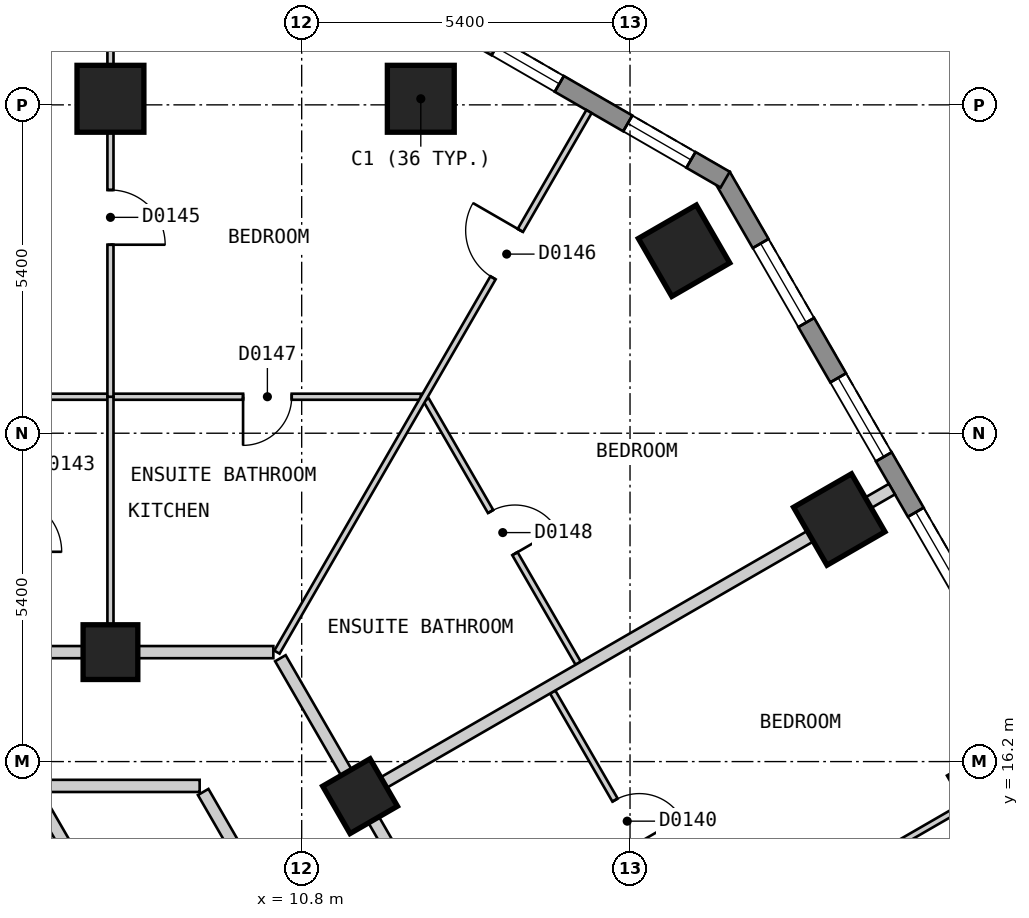
"""IFC4 building model, lengths in metres.
Left out: names, types, materials, properties, quantities, classifications, styles, units other than length and angle.
Written with IfcOpenShell. Run it as: python <this file> out.ifc"""

import sys

from ifc_helpers import new_model, si_unit, direction, frame, frame_2d, origin, origin_2d, place, context, subcontext, project, spatial, polyline, rectangle, outline, extrude, element, fill, save


model = new_model("IFC4")
c1 = context("Model", 3, precision=1e-05, world=origin(), true_north=direction((0.0, 1.0)))
c2 = subcontext(c1, "Body", "Model", "MODEL_VIEW")
j1 = project(units=[si_unit("LENGTHUNIT", "METRE"), si_unit("PLANEANGLEUNIT", "RADIAN")], contexts=[c1])
p1 = place(None, origin())
s1 = spatial("IfcSite", under=j1, at=p1, CompositionType="ELEMENT")
p2 = place(p1, origin())
s2 = spatial("IfcBuilding", under=s1, at=p2, CompositionType="ELEMENT")
p3 = place(p2, frame((0.0, 0.0, 29.4)))
s3 = spatial("IfcBuildingStorey", under=s2, at=p3, CompositionType="ELEMENT", Elevation=29.4)
for number, where, z_axis, x_axis in (
    (1, (12.759, 27.1, 0.0), (0.0, 0.0, 1.0), (-1.0, 0.0, 0.0)),
    (2, (7.655, 27.1, 0.0), (0.0, 0.0, 1.0), (-1.0, 0.0, 0.0)),
    (3, (22.193, 15.761, 0.0), (0.0, 0.0, 1.0), (-0.5, 0.866, 0.0)),
    (4, (19.641, 20.181, 0.0), (0.0, 0.0, 1.0), (-0.5, 0.866, 0.0)),
    (5, (17.089, 24.601, 0.0), (0.0, 0.0, 1.0), (-0.5, 0.866, 0.0)),
):
    element("IfcColumn", number, at=place(p3, frame(where, z_axis=z_axis, x_axis=x_axis)), inside=s3, PredefinedType="COLUMN", context=c2, shape_type="SweptSolid", body=[
        extrude(rectangle(XDim=1.1, YDim=1.1, at=origin_2d()), origin(), (0.0, 0.0, 1.0), 3.0),
    ])
for number, where, z_axis, x_axis in (
    (6, (11.76, 15.631, 0.0), (0.0, 0.0, 1.0), (-0.5, 0.866, 0.0)),
    (7, (7.655, 18.0, 0.0), (0.0, 0.0, 1.0), (-1.0, 0.0, 0.0)),
):
    element("IfcColumn", number, at=place(p3, frame(where, z_axis=z_axis, x_axis=x_axis)), inside=s3, PredefinedType="COLUMN", context=c2, shape_type="SweptSolid", body=[
        extrude(rectangle(XDim=0.9, YDim=0.9, at=origin_2d()), origin(), (0.0, 0.0, 1.0), 3.0),
    ])
p4 = place(p3, frame((31.22, 2.425, 0.0), z_axis=(0.0, 0.0, 1.0), x_axis=(-0.500001938803, 0.866024284413, 0.0)))
e8 = element("IfcWall", 8, at=p4, inside=s3, PredefinedType="SOLIDWALL", context=c2, shape_type="SweptSolid", body=[
    extrude(outline(polyline([(0.0, -0.15), (27.02, -0.15), (26.94, 0.15), (0.08, 0.15), (0.0, -0.15)])), origin(), (0.0, 0.0, 1.0), 2.7),
])
p5 = place(p4, frame((1.277, 0.0, 0.15)))
e9 = element("IfcOpeningElement", 9, at=p5, cuts=e8, PredefinedType="OPENING", context=c2, shape_type="SweptSolid", body=[
    extrude(rectangle(XDim=1.5, YDim=2.1, at=frame_2d((0.75, 1.05))), frame((0.0, 0.16, 0.0), z_axis=(0.0, -1.0, 0.0), x_axis=(1.0, 0.0, 0.0)), (0.0, 0.0, 1.0), 0.32),
])
p6 = place(p4, frame((3.829, 0.0, 0.15)))
e10 = element("IfcOpeningElement", 10, at=p6, cuts=e8, PredefinedType="OPENING", context=c2, shape_type="SweptSolid", body=[
    extrude(rectangle(XDim=1.5, YDim=2.1, at=frame_2d((0.75, 1.05))), frame((0.0, 0.16, 0.0), z_axis=(0.0, -1.0, 0.0), x_axis=(1.0, 0.0, 0.0)), (0.0, 0.0, 1.0), 0.32),
])
p7 = place(p4, frame((6.382, 0.0, 0.15)))
e11 = element("IfcOpeningElement", 11, at=p7, cuts=e8, PredefinedType="OPENING", context=c2, shape_type="SweptSolid", body=[
    extrude(rectangle(XDim=1.5, YDim=2.1, at=frame_2d((0.75, 1.05))), frame((0.0, 0.16, 0.0), z_axis=(0.0, -1.0, 0.0), x_axis=(1.0, 0.0, 0.0)), (0.0, 0.0, 1.0), 0.32),
])
p8 = place(p4, frame((8.933, 0.0, 0.15)))
e12 = element("IfcOpeningElement", 12, at=p8, cuts=e8, PredefinedType="OPENING", context=c2, shape_type="SweptSolid", body=[
    extrude(rectangle(XDim=1.5, YDim=2.1, at=frame_2d((0.75, 1.05))), frame((0.0, 0.16, 0.0), z_axis=(0.0, -1.0, 0.0), x_axis=(1.0, 0.0, 0.0)), (0.0, 0.0, 1.0), 0.32),
])
p9 = place(p4, frame((11.485, 0.0, 0.15)))
e13 = element("IfcOpeningElement", 13, at=p9, cuts=e8, PredefinedType="OPENING", context=c2, shape_type="SweptSolid", body=[
    extrude(rectangle(XDim=1.5, YDim=2.1, at=frame_2d((0.75, 1.05))), frame((0.0, 0.16, 0.0), z_axis=(0.0, -1.0, 0.0), x_axis=(1.0, 0.0, 0.0)), (0.0, 0.0, 1.0), 0.32),
])
p10 = place(p4, frame((14.037, 0.0, 0.15)))
e14 = element("IfcOpeningElement", 14, at=p10, cuts=e8, PredefinedType="OPENING", context=c2, shape_type="SweptSolid", body=[
    extrude(rectangle(XDim=1.5, YDim=2.1, at=frame_2d((0.75, 1.05))), frame((0.0, 0.16, 0.0), z_axis=(0.0, -1.0, 0.0), x_axis=(1.0, 0.0, 0.0)), (0.0, 0.0, 1.0), 0.32),
])
p11 = place(p4, frame((16.589, 0.0, 0.15)))
e15 = element("IfcOpeningElement", 15, at=p11, cuts=e8, PredefinedType="OPENING", context=c2, shape_type="SweptSolid", body=[
    extrude(rectangle(XDim=1.5, YDim=2.1, at=frame_2d((0.75, 1.05))), frame((0.0, 0.16, 0.0), z_axis=(0.0, -1.0, 0.0), x_axis=(1.0, 0.0, 0.0)), (0.0, 0.0, 1.0), 0.32),
])
p12 = place(p4, frame((19.141, 0.0, 0.15)))
e16 = element("IfcOpeningElement", 16, at=p12, cuts=e8, PredefinedType="OPENING", context=c2, shape_type="SweptSolid", body=[
    extrude(rectangle(XDim=1.5, YDim=2.1, at=frame_2d((0.75, 1.05))), frame((0.0, 0.16, 0.0), z_axis=(0.0, -1.0, 0.0), x_axis=(1.0, 0.0, 0.0)), (0.0, 0.0, 1.0), 0.32),
])
p13 = place(p4, frame((21.693, 0.0, 0.15)))
e17 = element("IfcOpeningElement", 17, at=p13, cuts=e8, PredefinedType="OPENING", context=c2, shape_type="SweptSolid", body=[
    extrude(rectangle(XDim=1.5, YDim=2.1, at=frame_2d((0.75, 1.05))), frame((0.0, 0.16, 0.0), z_axis=(0.0, -1.0, 0.0), x_axis=(1.0, 0.0, 0.0)), (0.0, 0.0, 1.0), 0.32),
])
p14 = place(p4, frame((24.244, 0.0, 0.15)))
e18 = element("IfcOpeningElement", 18, at=p14, cuts=e8, PredefinedType="OPENING", context=c2, shape_type="SweptSolid", body=[
    extrude(rectangle(XDim=1.5, YDim=2.1, at=frame_2d((0.75, 1.05))), frame((0.0, 0.16, 0.0), z_axis=(0.0, -1.0, 0.0), x_axis=(1.0, 0.0, 0.0)), (0.0, 0.0, 1.0), 0.32),
])
p15 = place(p3, frame((17.765, 25.77, 0.0), z_axis=(0.0, 0.0, 1.0), x_axis=(-0.866010750942, 0.50002537861, 0.0)))
e19 = element("IfcWall", 19, at=p15, inside=s3, PredefinedType="SOLIDWALL", context=c2, shape_type="SweptSolid", body=[
    extrude(outline(polyline([(0.0, -0.15), (5.0, -0.15), (4.919, 0.15), (0.08, 0.15), (0.0, -0.15)])), origin(), (0.0, 0.0, 1.0), 2.7),
])
p16 = place(p15, frame((0.65, 0.0, 0.15)))
e20 = element("IfcOpeningElement", 20, at=p16, cuts=e19, PredefinedType="OPENING", context=c2, shape_type="SweptSolid", body=[
    extrude(rectangle(XDim=1.2, YDim=2.1, at=frame_2d((0.6, 1.05))), frame((0.0, 0.16, 0.0), z_axis=(0.0, -1.0, 0.0), x_axis=(1.0, 0.0, 0.0)), (0.0, 0.0, 1.0), 0.32),
])
p17 = place(p15, frame((3.15, 0.0, 0.15)))
e21 = element("IfcOpeningElement", 21, at=p17, cuts=e19, PredefinedType="OPENING", context=c2, shape_type="SweptSolid", body=[
    extrude(rectangle(XDim=1.2, YDim=2.1, at=frame_2d((0.6, 1.05))), frame((0.0, 0.16, 0.0), z_axis=(0.0, -1.0, 0.0), x_axis=(1.0, 0.0, 0.0)), (0.0, 0.0, 1.0), 0.32),
])
p18 = place(p3, frame((6.409, 15.7, 0.0), z_axis=(0.0, 0.0, 1.0), x_axis=(0.499930377127, -0.866065596838, 0.0)))
e22 = element("IfcWall", 22, at=p18, inside=s3, PredefinedType="PARTITIONING", context=c2, shape_type="SweptSolid", body=[
    extrude(rectangle(XDim=8.775, YDim=0.2, at=frame_2d((4.388, 0.0))), origin(), (0.0, 0.0, 1.0), 2.7),
])
p19 = place(p3, frame((9.18, 15.7, 0.0), z_axis=(0.0, 0.0, 1.0), x_axis=(0.500003652032, -0.866023295272, 0.0)))
e23 = element("IfcWall", 23, at=p19, inside=s3, PredefinedType="PARTITIONING", context=c2, shape_type="SweptSolid", body=[
    extrude(rectangle(XDim=18.012, YDim=0.2, at=frame_2d((9.006, 0.0))), origin(), (0.0, 0.0, 1.0), 2.7),
])
p20 = place(p19, frame((8.556, 0.0, 0.0)))
e24 = element("IfcOpeningElement", 24, at=p20, cuts=e23, PredefinedType="OPENING", context=c2, shape_type="SweptSolid", body=[
    extrude(rectangle(XDim=0.9, YDim=2.1, at=frame_2d((0.45, 1.05))), frame((0.0, 0.11, 0.0), z_axis=(0.0, -1.0, 0.0), x_axis=(1.0, 0.0, 0.0)), (0.0, 0.0, 1.0), 0.22),
])
p21 = place(p3, frame((10.45, 17.9, 0.0), z_axis=(0.0, 0.0, 1.0), x_axis=(0.500034352617, -0.866005569383, 0.0)))
e25 = element("IfcWall", 25, at=p21, inside=s3, PredefinedType="PARTITIONING", context=c2, shape_type="SweptSolid", body=[
    extrude(rectangle(XDim=20.553, YDim=0.2, at=frame_2d((10.276, 0.0))), origin(), (0.0, 0.0, 1.0), 2.7),
])
p22 = place(p21, frame((14.903, 0.0, 0.0)))
e26 = element("IfcOpeningElement", 26, at=p22, cuts=e25, PredefinedType="OPENING", context=c2, shape_type="SweptSolid", body=[
    extrude(rectangle(XDim=1.0, YDim=2.1, at=frame_2d((0.5, 1.05))), frame((0.0, 0.11, 0.0), z_axis=(0.0, -1.0, 0.0), x_axis=(1.0, 0.0, 0.0)), (0.0, 0.0, 1.0), 0.22),
])
p23 = place(p21, frame((9.775, 0.0, 0.0)))
e27 = element("IfcOpeningElement", 27, at=p23, cuts=e25, PredefinedType="OPENING", context=c2, shape_type="SweptSolid", body=[
    extrude(rectangle(XDim=1.0, YDim=2.1, at=frame_2d((0.5, 1.05))), frame((0.0, 0.11, 0.0), z_axis=(0.0, -1.0, 0.0), x_axis=(1.0, 0.0, 0.0)), (0.0, 0.0, 1.0), 0.22),
])
p24 = place(p3, frame((6.351, 15.8, 0.0), z_axis=(0.0, 0.0, 1.0), x_axis=(1.0, 0.0, 0.0)))
e28 = element("IfcWall", 28, at=p24, inside=s3, PredefinedType="PARTITIONING", context=c2, shape_type="SweptSolid", body=[
    extrude(rectangle(XDim=2.771, YDim=0.2, at=frame_2d((1.385, 0.0))), origin(), (0.0, 0.0, 1.0), 2.7),
])
p25 = place(p3, frame((-10.276, 18.0, 0.0), z_axis=(0.0, 0.0, 1.0), x_axis=(1.0, 0.0, 0.0)))
e29 = element("IfcWall", 29, at=p25, inside=s3, PredefinedType="PARTITIONING", context=c2, shape_type="SweptSolid", body=[
    extrude(rectangle(XDim=20.61, YDim=0.2, at=frame_2d((10.305, 0.0))), origin(), (0.0, 0.0, 1.0), 2.7),
])
p26 = place(p25, frame((14.879, 0.0, 0.0)))
e30 = element("IfcOpeningElement", 30, at=p26, cuts=e29, PredefinedType="OPENING", context=c2, shape_type="SweptSolid", body=[
    extrude(rectangle(XDim=1.0, YDim=2.1, at=frame_2d((0.5, 1.05))), frame((0.0, 0.11, 0.0), z_axis=(0.0, -1.0, 0.0), x_axis=(1.0, 0.0, 0.0)), (0.0, 0.0, 1.0), 0.22),
])
p27 = place(p25, frame((9.775, 0.0, 0.0)))
e31 = element("IfcOpeningElement", 31, at=p27, cuts=e29, PredefinedType="OPENING", context=c2, shape_type="SweptSolid", body=[
    extrude(rectangle(XDim=1.0, YDim=2.1, at=frame_2d((0.5, 1.05))), frame((0.0, 0.11, 0.0), z_axis=(0.0, -1.0, 0.0), x_axis=(1.0, 0.0, 0.0)), (0.0, 0.0, 1.0), 0.22),
])
p28 = place(p25, frame((4.671, 0.0, 0.0)))
e32 = element("IfcOpeningElement", 32, at=p28, cuts=e29, PredefinedType="OPENING", context=c2, shape_type="SweptSolid", body=[
    extrude(rectangle(XDim=1.0, YDim=2.1, at=frame_2d((0.5, 1.05))), frame((0.0, 0.11, 0.0), z_axis=(0.0, -1.0, 0.0), x_axis=(1.0, 0.0, 0.0)), (0.0, 0.0, 1.0), 0.22),
])
p29 = place(p25, frame((0.837, 0.0, 0.0)))
e33 = element("IfcOpeningElement", 33, at=p29, cuts=e29, PredefinedType="OPENING", context=c2, shape_type="SweptSolid", body=[
    extrude(rectangle(XDim=0.8, YDim=2.1, at=frame_2d((0.4, 1.05))), frame((0.0, 0.11, 0.0), z_axis=(0.0, -1.0, 0.0), x_axis=(1.0, 0.0, 0.0)), (0.0, 0.0, 1.0), 0.22),
])
p30 = place(p3, frame((14.928, 17.344, 0.0), z_axis=(0.0, 0.0, 1.0), x_axis=(0.499881743012, -0.866093668724, 0.0)))
e34 = element("IfcWall", 34, at=p30, inside=s3, PredefinedType="PARTITIONING", context=c2, shape_type="SweptSolid", body=[
    extrude(rectangle(XDim=4.953, YDim=0.1, at=frame_2d((2.477, 0.0))), origin(), (0.0, 0.0, 1.0), 2.7),
])
p31 = place(p30, frame((2.052, 0.0, 0.0)))
e35 = element("IfcOpeningElement", 35, at=p31, cuts=e34, PredefinedType="OPENING", context=c2, shape_type="SweptSolid", body=[
    extrude(rectangle(XDim=0.8, YDim=2.1, at=frame_2d((0.4, 1.05))), frame((0.0, 0.06, 0.0), z_axis=(0.0, -1.0, 0.0), x_axis=(1.0, 0.0, 0.0)), (0.0, 0.0, 1.0), 0.12),
])
p32 = place(p3, frame((12.846, 22.15, 0.0), z_axis=(0.0, 0.0, 1.0), x_axis=(0.500002715276, -0.866023836113, 0.0)))
e36 = element("IfcWall", 36, at=p32, inside=s3, PredefinedType="PARTITIONING", context=c2, shape_type="SweptSolid", body=[
    extrude(rectangle(XDim=5.002, YDim=0.1, at=frame_2d((2.501, 0.0))), origin(), (0.0, 0.0, 1.0), 2.7),
])
p33 = place(p32, frame((2.122, 0.0, 0.0)))
e37 = element("IfcOpeningElement", 37, at=p33, cuts=e36, PredefinedType="OPENING", context=c2, shape_type="SweptSolid", body=[
    extrude(rectangle(XDim=0.8, YDim=2.1, at=frame_2d((0.4, 1.05))), frame((0.0, 0.06, 0.0), z_axis=(0.0, -1.0, 0.0), x_axis=(1.0, 0.0, 0.0)), (0.0, 0.0, 1.0), 0.12),
])
p34 = place(p3, frame((2.651, 22.2, 0.0), z_axis=(0.0, 0.0, 1.0), x_axis=(1.0, 0.0, 0.0)))
e38 = element("IfcWall", 38, at=p34, inside=s3, PredefinedType="PARTITIONING", context=c2, shape_type="SweptSolid", body=[
    extrude(rectangle(XDim=10.109, YDim=0.1, at=frame_2d((5.055, 0.0))), origin(), (0.0, 0.0, 1.0), 2.7),
])
p35 = place(p34, frame((2.002, 0.0, 0.0)))
e39 = element("IfcOpeningElement", 39, at=p35, cuts=e38, PredefinedType="OPENING", context=c2, shape_type="SweptSolid", body=[
    extrude(rectangle(XDim=0.9, YDim=2.1, at=frame_2d((0.45, 1.05))), frame((0.0, 0.06, 0.0), z_axis=(0.0, -1.0, 0.0), x_axis=(1.0, 0.0, 0.0)), (0.0, 0.0, 1.0), 0.12),
])
p36 = place(p34, frame((7.185, 0.0, 0.0)))
e40 = element("IfcOpeningElement", 40, at=p36, cuts=e38, PredefinedType="OPENING", context=c2, shape_type="SweptSolid", body=[
    extrude(rectangle(XDim=0.8, YDim=2.1, at=frame_2d((0.4, 1.05))), frame((0.0, 0.06, 0.0), z_axis=(0.0, -1.0, 0.0), x_axis=(1.0, 0.0, 0.0)), (0.0, 0.0, 1.0), 0.12),
])
p37 = place(p3, frame((10.393, 18.0, 0.0), z_axis=(0.0, 0.0, 1.0), x_axis=(0.499945497007, 0.866056868816, 0.0)))
e41 = element("IfcWall", 41, at=p37, inside=s3, PredefinedType="PARTITIONING", context=c2, shape_type="SweptSolid", body=[
    extrude(rectangle(XDim=10.265, YDim=0.1, at=frame_2d((5.132, 0.0))), origin(), (0.0, 0.0, 1.0), 2.7),
])
p38 = place(p37, frame((7.108, 0.0, 0.0)))
e42 = element("IfcOpeningElement", 42, at=p38, cuts=e41, PredefinedType="OPENING", context=c2, shape_type="SweptSolid", body=[
    extrude(rectangle(XDim=0.9, YDim=2.1, at=frame_2d((0.45, 1.05))), frame((0.0, 0.06, 0.0), z_axis=(0.0, -1.0, 0.0), x_axis=(1.0, 0.0, 0.0)), (0.0, 0.0, 1.0), 0.12),
])
p39 = place(p3, frame((7.655, 18.1, 0.0), z_axis=(0.0, 0.0, 1.0), x_axis=(0.0, 1.0, 0.0)))
e43 = element("IfcWall", 43, at=p39, inside=s3, PredefinedType="PARTITIONING", context=c2, shape_type="SweptSolid", body=[
    extrude(rectangle(XDim=4.1, YDim=0.1, at=frame_2d((2.05, 0.0))), origin(), (0.0, 0.0, 1.0), 2.7),
])
p40 = place(p3, frame((14.399, 11.261, 0.0), z_axis=(0.0, 0.0, 1.0), x_axis=(0.866022959057, 0.500004234368, 0.0)))
e44 = element("IfcWall", 44, at=p40, inside=s3, PredefinedType="PARTITIONING", context=c2, shape_type="SweptSolid", body=[
    extrude(rectangle(XDim=10.0, YDim=0.1, at=frame_2d((5.0, 0.0))), origin(), (0.0, 0.0, 1.0), 2.7),
])
p41 = place(p40, frame((4.775, 0.0, 0.0)))
e45 = element("IfcOpeningElement", 45, at=p41, cuts=e44, PredefinedType="OPENING", context=c2, shape_type="SweptSolid", body=[
    extrude(rectangle(XDim=0.9, YDim=2.1, at=frame_2d((0.45, 1.05))), frame((0.0, 0.06, 0.0), z_axis=(0.0, -1.0, 0.0), x_axis=(1.0, 0.0, 0.0)), (0.0, 0.0, 1.0), 0.12),
])
p42 = place(p3, frame((11.847, 15.681, 0.0), z_axis=(0.0, 0.0, 1.0), x_axis=(0.866022959057, 0.500004234368, 0.0)))
e46 = element("IfcWall", 46, at=p42, inside=s3, PredefinedType="PARTITIONING", context=c2, shape_type="SweptSolid", body=[
    extrude(rectangle(XDim=10.0, YDim=0.2, at=frame_2d((5.0, 0.0))), origin(), (0.0, 0.0, 1.0), 2.7),
])
p43 = place(p3, frame((7.655, 22.2, 0.0), z_axis=(0.0, 0.0, 1.0), x_axis=(0.0, 1.0, 0.0)))
e47 = element("IfcWall", 47, at=p43, inside=s3, PredefinedType="PARTITIONING", context=c2, shape_type="SweptSolid", body=[
    extrude(rectangle(XDim=5.9, YDim=0.1, at=frame_2d((2.95, 0.0))), origin(), (0.0, 0.0, 1.0), 2.7),
])
p44 = place(p43, frame((2.5, 0.0, 0.0)))
e48 = element("IfcOpeningElement", 48, at=p44, cuts=e47, PredefinedType="OPENING", context=c2, shape_type="SweptSolid", body=[
    extrude(rectangle(XDim=0.9, YDim=2.1, at=frame_2d((0.45, 1.05))), frame((0.0, 0.06, 0.0), z_axis=(0.0, -1.0, 0.0), x_axis=(1.0, 0.0, 0.0)), (0.0, 0.0, 1.0), 0.12),
])
p45 = place(p12, origin())
e49 = element("IfcWindow", 49, at=p45, inside=s3, PartitioningType="SINGLE_PANEL", PredefinedType="WINDOW", context=c2, shape_type="SweptSolid", body=[
    extrude(rectangle(XDim=1.5, YDim=2.1, at=frame_2d((0.75, 1.05))), frame((0.0, 0.03, 0.0), z_axis=(0.0, -1.0, 0.0), x_axis=(1.0, 0.0, 0.0)), (0.0, 0.0, 1.0), 0.06),
])
fill(e16, e49)
p46 = place(p13, origin())
e50 = element("IfcWindow", 50, at=p46, inside=s3, PartitioningType="SINGLE_PANEL", PredefinedType="WINDOW", context=c2, shape_type="SweptSolid", body=[
    extrude(rectangle(XDim=1.5, YDim=2.1, at=frame_2d((0.75, 1.05))), frame((0.0, 0.03, 0.0), z_axis=(0.0, -1.0, 0.0), x_axis=(1.0, 0.0, 0.0)), (0.0, 0.0, 1.0), 0.06),
])
fill(e17, e50)
p47 = place(p14, origin())
e51 = element("IfcWindow", 51, at=p47, inside=s3, PartitioningType="SINGLE_PANEL", PredefinedType="WINDOW", context=c2, shape_type="SweptSolid", body=[
    extrude(rectangle(XDim=1.5, YDim=2.1, at=frame_2d((0.75, 1.05))), frame((0.0, 0.03, 0.0), z_axis=(0.0, -1.0, 0.0), x_axis=(1.0, 0.0, 0.0)), (0.0, 0.0, 1.0), 0.06),
])
fill(e18, e51)
p48 = place(p16, origin())
e52 = element("IfcWindow", 52, at=p48, inside=s3, PartitioningType="SINGLE_PANEL", PredefinedType="WINDOW", context=c2, shape_type="SweptSolid", body=[
    extrude(rectangle(XDim=1.2, YDim=2.1, at=frame_2d((0.6, 1.05))), frame((0.0, 0.03, 0.0), z_axis=(0.0, -1.0, 0.0), x_axis=(1.0, 0.0, 0.0)), (0.0, 0.0, 1.0), 0.06),
])
fill(e20, e52)
p49 = place(p17, origin())
e53 = element("IfcWindow", 53, at=p49, inside=s3, PartitioningType="SINGLE_PANEL", PredefinedType="WINDOW", context=c2, shape_type="SweptSolid", body=[
    extrude(rectangle(XDim=1.2, YDim=2.1, at=frame_2d((0.6, 1.05))), frame((0.0, 0.03, 0.0), z_axis=(0.0, -1.0, 0.0), x_axis=(1.0, 0.0, 0.0)), (0.0, 0.0, 1.0), 0.06),
])
fill(e21, e53)
p50 = place(p31, origin())
e54 = element("IfcDoor", 54, at=p50, inside=s3, OperationType="SINGLE_SWING_RIGHT", PredefinedType="DOOR", context=c2, shape_type="SweptSolid", body=[
    extrude(rectangle(XDim=0.8, YDim=2.1, at=frame_2d((0.4, 1.05))), frame((0.0, 0.025, 0.0), z_axis=(0.0, -1.0, 0.0), x_axis=(1.0, 0.0, 0.0)), (0.0, 0.0, 1.0), 0.05),
])
fill(e35, e54)
p51 = place(p44, origin())
e55 = element("IfcDoor", 55, at=p51, inside=s3, OperationType="SINGLE_SWING_LEFT", PredefinedType="DOOR", context=c2, shape_type="SweptSolid", body=[
    extrude(rectangle(XDim=0.9, YDim=2.1, at=frame_2d((0.45, 1.05))), frame((0.0, 0.025, 0.0), z_axis=(0.0, -1.0, 0.0), x_axis=(1.0, 0.0, 0.0)), (0.0, 0.0, 1.0), 0.05),
])
fill(e48, e55)
p52 = place(p38, origin())
e56 = element("IfcDoor", 56, at=p52, inside=s3, OperationType="SINGLE_SWING_RIGHT", PredefinedType="DOOR", context=c2, shape_type="SweptSolid", body=[
    extrude(rectangle(XDim=0.9, YDim=2.1, at=frame_2d((0.45, 1.05))), frame((0.0, 0.025, 0.0), z_axis=(0.0, -1.0, 0.0), x_axis=(1.0, 0.0, 0.0)), (0.0, 0.0, 1.0), 0.05),
])
fill(e42, e56)
p53 = place(p36, origin())
e57 = element("IfcDoor", 57, at=p53, inside=s3, OperationType="SINGLE_SWING_LEFT", PredefinedType="DOOR", context=c2, shape_type="SweptSolid", body=[
    extrude(rectangle(XDim=0.8, YDim=2.1, at=frame_2d((0.4, 1.05))), frame((0.0, 0.025, 0.0), z_axis=(0.0, -1.0, 0.0), x_axis=(1.0, 0.0, 0.0)), (0.0, 0.0, 1.0), 0.05),
])
fill(e40, e57)
p54 = place(p33, origin())
e58 = element("IfcDoor", 58, at=p54, inside=s3, OperationType="SINGLE_SWING_RIGHT", PredefinedType="DOOR", context=c2, shape_type="SweptSolid", body=[
    extrude(rectangle(XDim=0.8, YDim=2.1, at=frame_2d((0.4, 1.05))), frame((0.0, 0.025, 0.0), z_axis=(0.0, -1.0, 0.0), x_axis=(1.0, 0.0, 0.0)), (0.0, 0.0, 1.0), 0.05),
])
fill(e37, e58)
save(model, sys.argv[1])
